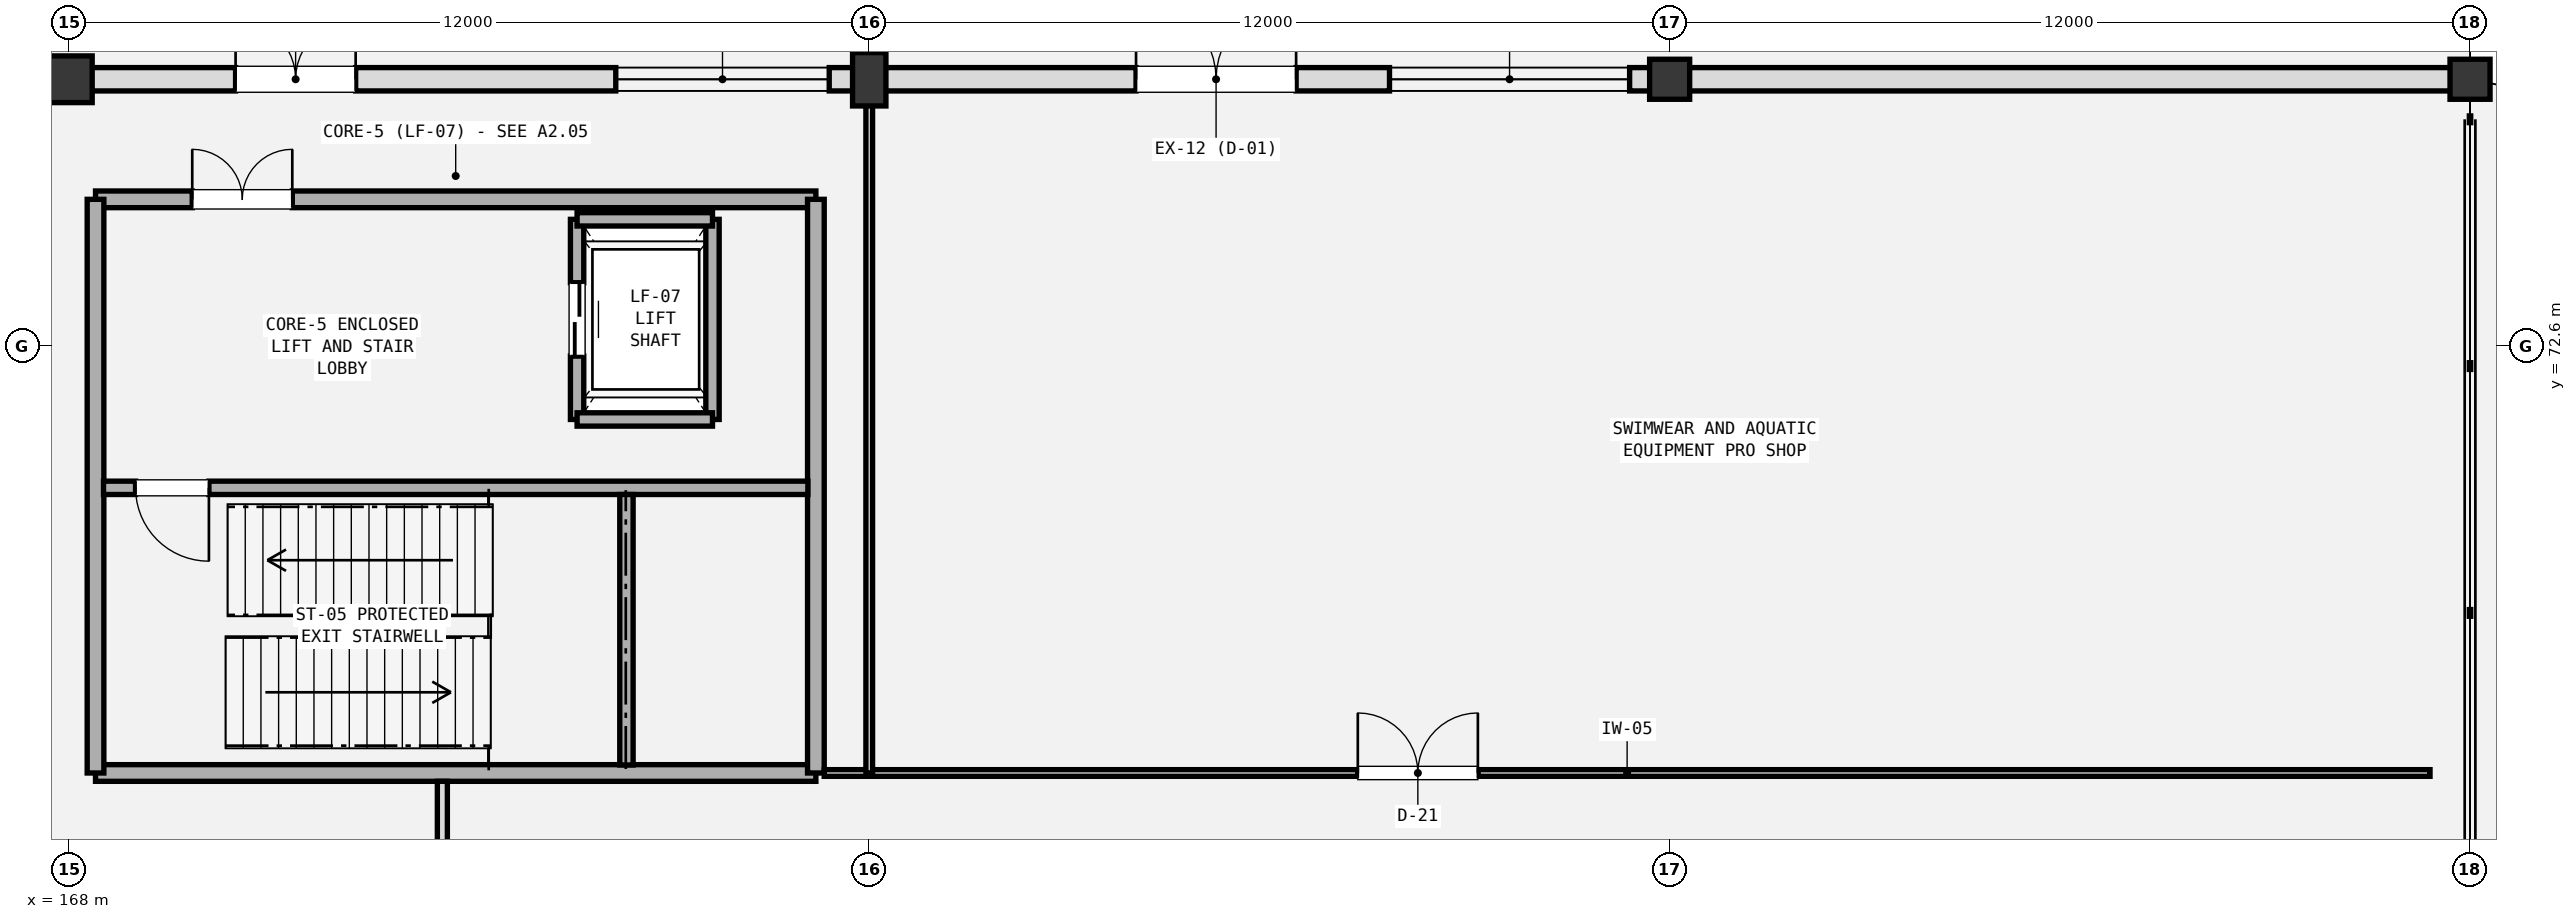
"""IFC4 building model, lengths in metres.
Left out: names, types, materials, properties, quantities, classifications, styles, units other than length and angle.
Written with IfcOpenShell. Run it as: python <this file> out.ifc"""

import sys

from ifc_helpers import new_model, si_unit, direction, frame, frame_2d, origin, origin_2d, place, context, subcontext, project, spatial, rectangle, circle, extrude, element, fill, save


model = new_model("IFC4")
c1 = context("Model", 3, precision=1e-05, world=origin(), true_north=direction((0.0, 1.0)))
c2 = subcontext(c1, "Body", "Model", "MODEL_VIEW")
j1 = project(units=[si_unit("LENGTHUNIT", "METRE"), si_unit("PLANEANGLEUNIT", "RADIAN")], contexts=[c1])
p1 = place(None, origin())
s1 = spatial("IfcSite", under=j1, at=p1, CompositionType="ELEMENT")
p2 = place(p1, origin())
s2 = spatial("IfcBuilding", under=s1, at=p2, CompositionType="ELEMENT")
p3 = place(p2, origin())
s3 = spatial("IfcBuildingStorey", under=s2, at=p3, CompositionType="ELEMENT", Elevation=0.0)
p4 = place(p3, frame((168.0, 76.6, 0.0), z_axis=(0.0, 0.0, 1.0), x_axis=(1.0, 0.0, 0.0)))
e1 = element("IfcColumn", 1, at=p4, inside=s3, PredefinedType="COLUMN", context=c2, shape_type="SweptSolid", body=[
    extrude(rectangle(XDim=0.7, YDim=0.7, at=origin_2d()), origin(), (0.0, 0.0, 1.0), 5.4),
])
p5 = place(p3, frame((180.0, 76.6, 0.0), z_axis=(0.0, 0.0, 1.0), x_axis=(1.0, 0.0, 0.0)))
e2 = element("IfcColumn", 2, at=p5, inside=s3, PredefinedType="COLUMN", context=c2, shape_type="SweptSolid", body=[
    extrude(rectangle(XDim=0.5, YDim=0.8, at=origin_2d()), origin(), (0.0, 0.0, 1.0), 5.4),
])
p6 = place(p3, frame((192.0, 76.6, 0.0), z_axis=(0.0, 0.0, 1.0), x_axis=(1.0, 0.0, 0.0)))
e3 = element("IfcColumn", 3, at=p6, inside=s3, PredefinedType="COLUMN", context=c2, shape_type="SweptSolid", body=[
    extrude(circle(Radius=0.3, at=origin_2d()), origin(), (0.0, 0.0, 1.0), 5.4),
])
p7 = place(p3, frame((204.0, 76.6, 0.0), z_axis=(0.0, 0.0, 1.0), x_axis=(1.0, 0.0, 0.0)))
e4 = element("IfcColumn", 4, at=p7, inside=s3, PredefinedType="COLUMN", context=c2, shape_type="SweptSolid", body=[
    extrude(circle(Radius=0.3, at=origin_2d()), origin(), (0.0, 0.0, 1.0), 5.14),
])
p8 = place(p3, frame((162.0, 76.6, 0.0), z_axis=(0.0, 0.0, 1.0), x_axis=(1.0, 0.0, 0.0)))
e5 = element("IfcWall", 5, at=p8, inside=s3, PredefinedType="SOLIDWALL", context=c2, shape_type="SweptSolid", body=[
    extrude(rectangle(XDim=42.0, YDim=0.35, at=frame_2d((21.0, 0.0))), origin(), (0.0, 0.0, 1.0), 4.33),
])
p9 = place(p8, frame((8.5, 0.0, 0.0)))
e6 = element("IfcOpeningElement", 6, at=p9, cuts=e5, PredefinedType="OPENING", context=c2, shape_type="SweptSolid", body=[
    extrude(rectangle(XDim=1.8, YDim=2.3, at=frame_2d((0.9, 1.15))), frame((0.0, 0.185, 0.0), z_axis=(0.0, -1.0, 0.0), x_axis=(1.0, 0.0, 0.0)), (0.0, 0.0, 1.0), 0.37),
])
p10 = place(p8, frame((22.0, 0.0, 0.0)))
e7 = element("IfcOpeningElement", 7, at=p10, cuts=e5, PredefinedType="OPENING", context=c2, shape_type="SweptSolid", body=[
    extrude(rectangle(XDim=2.4, YDim=2.5, at=frame_2d((1.2, 1.25))), frame((0.0, 0.185, 0.0), z_axis=(0.0, -1.0, 0.0), x_axis=(1.0, 0.0, 0.0)), (0.0, 0.0, 1.0), 0.37),
])
p11 = place(p8, frame((2.0, 0.0, 0.85)))
e8 = element("IfcOpeningElement", 8, at=p11, cuts=e5, PredefinedType="OPENING", context=c2, shape_type="SweptSolid", body=[
    extrude(rectangle(XDim=2.6, YDim=1.4, at=frame_2d((1.3, 0.7))), frame((0.0, 0.185, 0.0), z_axis=(0.0, -1.0, 0.0), x_axis=(1.0, 0.0, 0.0)), (0.0, 0.0, 1.0), 0.37),
])
p12 = place(p8, frame((14.2, 0.0, 0.85)))
e9 = element("IfcOpeningElement", 9, at=p12, cuts=e5, PredefinedType="OPENING", context=c2, shape_type="SweptSolid", body=[
    extrude(rectangle(XDim=3.2, YDim=1.2, at=frame_2d((1.6, 0.6))), frame((0.0, 0.185, 0.0), z_axis=(0.0, -1.0, 0.0), x_axis=(1.0, 0.0, 0.0)), (0.0, 0.0, 1.0), 0.37),
])
p13 = place(p8, frame((25.8, 0.0, 0.85)))
e10 = element("IfcOpeningElement", 10, at=p13, cuts=e5, PredefinedType="OPENING", context=c2, shape_type="SweptSolid", body=[
    extrude(rectangle(XDim=3.6, YDim=1.2, at=frame_2d((1.8, 0.6))), frame((0.0, 0.185, 0.0), z_axis=(0.0, -1.0, 0.0), x_axis=(1.0, 0.0, 0.0)), (0.0, 0.0, 1.0), 0.37),
])
p14 = place(p3, frame((168.4, 66.2, 0.0), z_axis=(0.0, 0.0, 1.0), x_axis=(1.0, 0.0, 0.0)))
e11 = element("IfcWall", 11, at=p14, inside=s3, PredefinedType="SHEAR", context=c2, shape_type="SweptSolid", body=[
    extrude(rectangle(XDim=10.8, YDim=0.25, at=frame_2d((5.4, 0.0))), origin(), (0.0, 0.0, 1.0), 5.08),
])
p15 = place(p3, frame((168.4, 74.8, 0.0), z_axis=(0.0, 0.0, 1.0), x_axis=(1.0, 0.0, 0.0)))
e12 = element("IfcWall", 12, at=p15, inside=s3, PredefinedType="SHEAR", context=c2, shape_type="SweptSolid", body=[
    extrude(rectangle(XDim=10.8, YDim=0.25, at=frame_2d((5.4, 0.0))), origin(), (0.0, 0.0, 1.0), 5.08),
])
p16 = place(p15, frame((1.45, 0.0, 0.0)))
e13 = element("IfcOpeningElement", 13, at=p16, cuts=e12, PredefinedType="OPENING", context=c2, shape_type="SweptSolid", body=[
    extrude(rectangle(XDim=1.5, YDim=2.2, at=frame_2d((0.75, 1.1))), frame((0.0, 0.135, 0.0), z_axis=(0.0, -1.0, 0.0), x_axis=(1.0, 0.0, 0.0)), (0.0, 0.0, 1.0), 0.27),
])
for number, where, z_axis, x_axis in (
    (14, (168.4, 66.2, 0.0), (0.0, 0.0, 1.0), (0.0, 1.0, 0.0)),
    (15, (179.2, 66.2, 0.0), (0.0, 0.0, 1.0), (0.0, 1.0, 0.0)),
):
    element("IfcWall", number, at=place(p3, frame(where, z_axis=z_axis, x_axis=x_axis)), inside=s3, PredefinedType="SHEAR", context=c2, shape_type="SweptSolid", body=[
        extrude(rectangle(XDim=8.6, YDim=0.25, at=frame_2d((4.3, 0.0))), origin(), (0.0, 0.0, 1.0), 5.08),
    ])
p17 = place(p3, frame((168.52, 70.475, 0.0), z_axis=(0.0, 0.0, 1.0), x_axis=(1.0, 0.0, 0.0)))
e16 = element("IfcWall", 16, at=p17, inside=s3, PredefinedType="SHEAR", context=c2, shape_type="SweptSolid", body=[
    extrude(rectangle(XDim=10.56, YDim=0.2, at=frame_2d((5.28, 0.0))), origin(), (0.0, 0.0, 1.0), 5.08),
])
p18 = place(p17, frame((0.48, 0.0, 0.0)))
e17 = element("IfcOpeningElement", 17, at=p18, cuts=e16, PredefinedType="OPENING", context=c2, shape_type="SweptSolid", body=[
    extrude(rectangle(XDim=1.1, YDim=2.2, at=frame_2d((0.55, 1.1))), frame((0.0, 0.11, 0.0), z_axis=(0.0, -1.0, 0.0), x_axis=(1.0, 0.0, 0.0)), (0.0, 0.0, 1.0), 0.22),
])
p19 = place(p3, frame((176.36, 66.32, 0.0), z_axis=(0.0, 0.0, 1.0), x_axis=(0.0, 1.0, 0.0)))
e18 = element("IfcWall", 18, at=p19, inside=s3, PredefinedType="SHEAR", context=c2, shape_type="SweptSolid", body=[
    extrude(rectangle(XDim=4.055, YDim=0.2, at=frame_2d((2.027, 0.0))), origin(), (0.0, 0.0, 1.0), 5.08),
])
p20 = place(p3, frame((175.62, 71.5, 0.0), z_axis=(0.0, 0.0, 1.0), x_axis=(0.0, 1.0, 0.0)))
e19 = element("IfcWall", 19, at=p20, inside=s3, PredefinedType="SHEAR", context=c2, shape_type="SweptSolid", body=[
    extrude(rectangle(XDim=3.0, YDim=0.2, at=frame_2d((1.5, 0.0))), origin(), (0.0, 0.0, 1.0), 5.08),
])
p21 = place(p20, frame((0.95, 0.0, 0.0)))
e20 = element("IfcOpeningElement", 20, at=p21, cuts=e19, PredefinedType="OPENING", context=c2, shape_type="SweptSolid", body=[
    extrude(rectangle(XDim=1.1, YDim=2.2, at=frame_2d((0.55, 1.1))), frame((0.0, 0.11, 0.0), z_axis=(0.0, -1.0, 0.0), x_axis=(1.0, 0.0, 0.0)), (0.0, 0.0, 1.0), 0.22),
])
p22 = place(p3, frame((177.65, 71.5, 0.0), z_axis=(0.0, 0.0, 1.0), x_axis=(0.0, 1.0, 0.0)))
e21 = element("IfcWall", 21, at=p22, inside=s3, PredefinedType="SHEAR", context=c2, shape_type="SweptSolid", body=[
    extrude(rectangle(XDim=3.0, YDim=0.2, at=frame_2d((1.5, 0.0))), origin(), (0.0, 0.0, 1.0), 5.08),
])
for number, where, z_axis, x_axis in (
    (22, (175.62, 71.5, 0.0), (0.0, 0.0, 1.0), (1.0, 0.0, 0.0)),
    (23, (175.62, 74.5, 0.0), (0.0, 0.0, 1.0), (1.0, 0.0, 0.0)),
):
    element("IfcWall", number, at=place(p3, frame(where, z_axis=z_axis, x_axis=x_axis)), inside=s3, PredefinedType="SHEAR", context=c2, shape_type="SweptSolid", body=[
        extrude(rectangle(XDim=2.03, YDim=0.2, at=frame_2d((1.015, 0.0))), origin(), (0.0, 0.0, 1.0), 5.08),
    ])
p23 = place(p3, frame((179.325, 66.2, 0.0), z_axis=(0.0, 0.0, 1.0), x_axis=(1.0, 0.0, 0.0)))
e24 = element("IfcWall", 24, at=p23, inside=s3, PredefinedType="PARTITIONING", context=c2, shape_type="SweptSolid", body=[
    extrude(rectangle(XDim=24.075, YDim=0.1, at=frame_2d((12.038, 0.0))), origin(), (0.0, 0.0, 1.0), 3.9),
])
p24 = place(p23, frame((8.0, 0.0, 0.0)))
e25 = element("IfcOpeningElement", 25, at=p24, cuts=e24, PredefinedType="OPENING", context=c2, shape_type="SweptSolid", body=[
    extrude(rectangle(XDim=1.8, YDim=2.4, at=frame_2d((0.9, 1.2))), frame((0.0, 0.06, 0.0), z_axis=(0.0, -1.0, 0.0), x_axis=(1.0, 0.0, 0.0)), (0.0, 0.0, 1.0), 0.12),
])
p25 = place(p3, frame((180.0, 66.2, 0.0), z_axis=(0.0, 0.0, 1.0), x_axis=(0.0, 1.0, 0.0)))
e26 = element("IfcWall", 26, at=p25, inside=s3, PredefinedType="PARTITIONING", context=c2, shape_type="SweptSolid", body=[
    extrude(rectangle(XDim=10.225, YDim=0.1, at=frame_2d((5.113, 0.0))), origin(), (0.0, 0.0, 1.0), 3.9),
])
p26 = place(p3, frame((173.6, 48.0, 0.0), z_axis=(0.0, 0.0, 1.0), x_axis=(0.0, 1.0, 0.0)))
e27 = element("IfcWall", 27, at=p26, inside=s3, PredefinedType="PARTITIONING", context=c2, shape_type="SweptSolid", body=[
    extrude(rectangle(XDim=18.075, YDim=0.15, at=frame_2d((9.038, 0.0))), origin(), (0.0, 0.0, 1.0), 3.9),
])
p27 = place(p26, frame((6.0, 0.0, 0.0)))
e28 = element("IfcOpeningElement", 28, at=p27, cuts=e27, PredefinedType="OPENING", context=c2, shape_type="SweptSolid", body=[
    extrude(rectangle(XDim=1.6, YDim=2.2, at=frame_2d((0.8, 1.1))), frame((0.0, 0.085, 0.0), z_axis=(0.0, -1.0, 0.0), x_axis=(1.0, 0.0, 0.0)), (0.0, 0.0, 1.0), 0.17),
])
p28 = place(p9, origin())
e29 = element("IfcDoor", 29, at=p28, inside=s3, OperationType="DOUBLE_DOOR_SINGLE_SWING", PredefinedType="DOOR", context=c2, shape_type="SweptSolid", body=[
    extrude(rectangle(XDim=1.8, YDim=2.3, at=frame_2d((0.9, 1.15))), frame((0.0, 0.025, 0.0), z_axis=(0.0, -1.0, 0.0), x_axis=(1.0, 0.0, 0.0)), (0.0, 0.0, 1.0), 0.05),
])
fill(e6, e29)
p29 = place(p10, origin())
e30 = element("IfcDoor", 30, at=p29, inside=s3, OperationType="DOUBLE_DOOR_SINGLE_SWING", PredefinedType="DOOR", context=c2, shape_type="SweptSolid", body=[
    extrude(rectangle(XDim=2.4, YDim=2.5, at=frame_2d((1.2, 1.25))), frame((0.0, 0.025, 0.0), z_axis=(0.0, -1.0, 0.0), x_axis=(1.0, 0.0, 0.0)), (0.0, 0.0, 1.0), 0.05),
])
fill(e7, e30)
p30 = place(p12, origin())
e31 = element("IfcWindow", 31, at=p30, inside=s3, PartitioningType="DOUBLE_PANEL_HORIZONTAL", PredefinedType="WINDOW", context=c2, shape_type="SweptSolid", body=[
    extrude(rectangle(XDim=3.2, YDim=1.2, at=frame_2d((1.6, 0.6))), frame((0.0, 0.03, 0.0), z_axis=(0.0, -1.0, 0.0), x_axis=(1.0, 0.0, 0.0)), (0.0, 0.0, 1.0), 0.06),
])
fill(e9, e31)
p31 = place(p13, origin())
e32 = element("IfcWindow", 32, at=p31, inside=s3, PartitioningType="TRIPLE_PANEL_HORIZONTAL", PredefinedType="WINDOW", context=c2, shape_type="SweptSolid", body=[
    extrude(rectangle(XDim=3.6, YDim=1.2, at=frame_2d((1.8, 0.6))), frame((0.0, 0.03, 0.0), z_axis=(0.0, -1.0, 0.0), x_axis=(1.0, 0.0, 0.0)), (0.0, 0.0, 1.0), 0.06),
])
fill(e10, e32)
p32 = place(p16, origin())
e33 = element("IfcDoor", 33, at=p32, inside=s3, OperationType="DOUBLE_DOOR_SINGLE_SWING", PredefinedType="DOOR", context=c2, shape_type="SweptSolid", body=[
    extrude(rectangle(XDim=1.5, YDim=2.2, at=frame_2d((0.75, 1.1))), frame((0.0, 0.025, 0.0), z_axis=(0.0, -1.0, 0.0), x_axis=(1.0, 0.0, 0.0)), (0.0, 0.0, 1.0), 0.05),
])
fill(e13, e33)
p33 = place(p18, frame((1.1, 0.0, 0.0), z_axis=(0.0, 0.0, 1.0), x_axis=(-1.0, 0.0, 0.0)))
e34 = element("IfcDoor", 34, at=p33, inside=s3, OperationType="SINGLE_SWING_LEFT", PredefinedType="DOOR", context=c2, shape_type="SweptSolid", body=[
    extrude(rectangle(XDim=1.1, YDim=2.2, at=frame_2d((0.55, 1.1))), frame((0.0, 0.025, 0.0), z_axis=(0.0, -1.0, 0.0), x_axis=(1.0, 0.0, 0.0)), (0.0, 0.0, 1.0), 0.05),
])
fill(e17, e34)
p34 = place(p21, origin())
e35 = element("IfcDoor", 35, at=p34, inside=s3, OperationType="DOUBLE_DOOR_SLIDING", PredefinedType="DOOR", context=c2, shape_type="SweptSolid", body=[
    extrude(rectangle(XDim=1.1, YDim=2.2, at=frame_2d((0.55, 1.1))), frame((0.0, 0.025, 0.0), z_axis=(0.0, -1.0, 0.0), x_axis=(1.0, 0.0, 0.0)), (0.0, 0.0, 1.0), 0.05),
])
fill(e20, e35)
p35 = place(p24, origin())
e36 = element("IfcDoor", 36, at=p35, inside=s3, OperationType="DOUBLE_DOOR_SINGLE_SWING", PredefinedType="DOOR", context=c2, shape_type="SweptSolid", body=[
    extrude(rectangle(XDim=1.8, YDim=2.4, at=frame_2d((0.9, 1.2))), frame((0.0, 0.025, 0.0), z_axis=(0.0, -1.0, 0.0), x_axis=(1.0, 0.0, 0.0)), (0.0, 0.0, 1.0), 0.05),
])
fill(e25, e36)
save(model, sys.argv[1])
